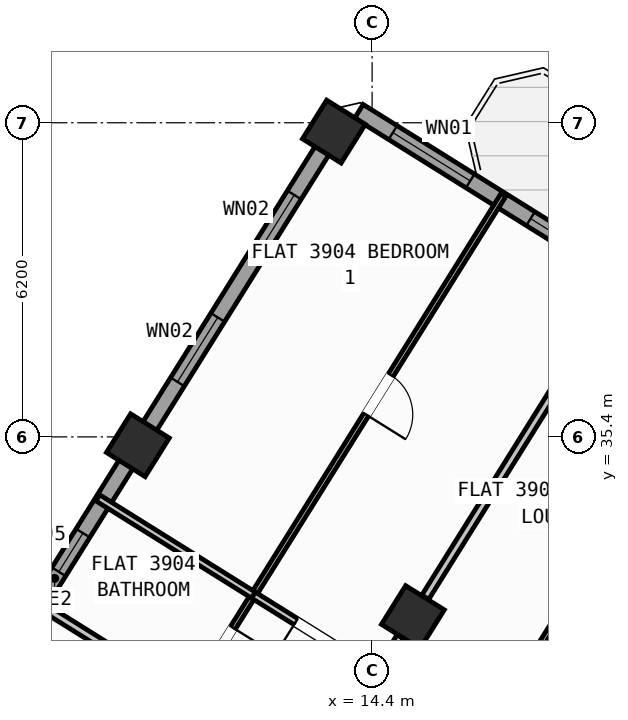
"""IFC4 building model, lengths in metres.
Left out: names, types, materials, properties, quantities, classifications, styles, units other than length and angle.
Written with IfcOpenShell. Run it as: python <this file> out.ifc"""

import sys

from ifc_helpers import new_model, si_unit, direction, frame, frame_2d, origin, origin_2d, place, context, subcontext, project, spatial, rectangle, hollow_rectangle, extrude, source, transform, mapped, element, fill, save


model = new_model("IFC4")
c1 = context("Model", 3, precision=1e-05, world=origin(), true_north=direction((0.0, 1.0)))
c2 = subcontext(c1, "Body", "Model", "MODEL_VIEW")
j1 = project(units=[si_unit("LENGTHUNIT", "METRE"), si_unit("PLANEANGLEUNIT", "RADIAN")], contexts=[c1])
p1 = place(None, origin())
s1 = spatial("IfcSite", under=j1, at=p1, CompositionType="ELEMENT")
p2 = place(p1, origin())
s2 = spatial("IfcBuilding", under=s1, at=p2, CompositionType="ELEMENT")
p3 = place(p2, frame((0.0, 0.0, 155.1)))
s3 = spatial("IfcBuildingStorey", under=s2, at=p3, CompositionType="ELEMENT", Elevation=155.1)
m1 = source(origin(), c2, "Body", "SweptSolid", [
    extrude(hollow_rectangle(XDim=0.9, YDim=0.9, WallThickness=0.036, at=origin_2d()), origin(), (0.0, 0.0, 1.0), 3.6),
])
for number, where, z_axis, x_axis in (
    (1, (15.205, 31.844, 0.0), (0.0, 0.0, 1.0), (-0.848, 0.53, 0.0)),
    (2, (13.646, 41.426, 0.0), (0.0, 0.0, 1.0), (-0.848, 0.53, 0.0)),
    (3, (9.777, 35.235, 0.0), (0.0, 0.0, 1.0), (-0.848, 0.53, 0.0)),
):
    element("IfcColumn", number, at=place(p3, frame(where, z_axis=z_axis, x_axis=x_axis)), inside=s3, PredefinedType="COLUMN", context=c2, shape_type="MappedRepresentation", body=[
        mapped(m1, transform((0.0, 0.0, 0.0), scale=1.0)),
    ])
p4 = place(p3, frame((2.415, 23.452, 0.0), z_axis=(0.0, 0.0, 1.0), x_axis=(0.52991049553, 0.848053575387, 0.0)))
e4 = element("IfcWall", 4, at=p4, inside=s3, PredefinedType="STANDARD", context=c2, shape_type="SweptSolid", body=[
    extrude(rectangle(XDim=21.587, YDim=0.32, at=frame_2d((10.794, 0.0))), origin(), (0.0, 0.0, 1.0), 2.775),
])
p5 = place(p4, frame((1.406, 0.0, 0.8)))
e5 = element("IfcOpeningElement", 5, at=p5, cuts=e4, PredefinedType="OPENING", context=c2, shape_type="SweptSolid", body=[
    extrude(rectangle(XDim=2.1, YDim=1.55, at=frame_2d((1.05, 0.775))), frame((0.0, 0.17, 0.0), z_axis=(0.0, -1.0, 0.0), x_axis=(1.0, 0.0, 0.0)), (0.0, 0.0, 1.0), 0.34),
])
p6 = place(p4, frame((10.949, 0.0, 1.0)))
e6 = element("IfcOpeningElement", 6, at=p6, cuts=e4, PredefinedType="OPENING", context=c2, shape_type="SweptSolid", body=[
    extrude(rectangle(XDim=0.9, YDim=1.25, at=frame_2d((0.45, 0.625))), frame((0.0, 0.17, 0.0), z_axis=(0.0, -1.0, 0.0), x_axis=(1.0, 0.0, 0.0)), (0.0, 0.0, 1.0), 0.34),
])
p7 = place(p4, frame((15.369, 0.0, 0.85)))
e7 = element("IfcOpeningElement", 7, at=p7, cuts=e4, PredefinedType="OPENING", context=c2, shape_type="SweptSolid", body=[
    extrude(rectangle(XDim=1.5, YDim=1.5, at=frame_2d((0.75, 0.75))), frame((0.0, 0.17, 0.0), z_axis=(0.0, -1.0, 0.0), x_axis=(1.0, 0.0, 0.0)), (0.0, 0.0, 1.0), 0.34),
])
p8 = place(p4, frame((18.219, 0.0, 0.85)))
e8 = element("IfcOpeningElement", 8, at=p8, cuts=e4, PredefinedType="OPENING", context=c2, shape_type="SweptSolid", body=[
    extrude(rectangle(XDim=1.5, YDim=1.5, at=frame_2d((0.75, 0.75))), frame((0.0, 0.17, 0.0), z_axis=(0.0, -1.0, 0.0), x_axis=(1.0, 0.0, 0.0)), (0.0, 0.0, 1.0), 0.34),
])
p9 = place(p3, frame((14.138, 41.825, 0.0), z_axis=(0.0, 0.0, 1.0), x_axis=(0.848046498049, -0.529921821731, 0.0)))
e9 = element("IfcWall", 9, at=p9, inside=s3, PredefinedType="STANDARD", context=c2, shape_type="SweptSolid", body=[
    extrude(rectangle(XDim=31.588, YDim=0.32, at=frame_2d((15.794, 0.0))), origin(), (0.0, 0.0, 1.0), 3.35),
])
p10 = place(p9, frame((9.792, 0.0, 0.0)))
e10 = element("IfcOpeningElement", 10, at=p10, cuts=e9, PredefinedType="OPENING", context=c2, shape_type="SweptSolid", body=[
    extrude(rectangle(XDim=1.05, YDim=2.15, at=frame_2d((0.525, 1.075))), frame((0.0, 0.17, 0.0), z_axis=(0.0, -1.0, 0.0), x_axis=(1.0, 0.0, 0.0)), (0.0, 0.0, 1.0), 0.34),
])
p11 = place(p9, frame((0.791, 0.0, 0.85)))
e11 = element("IfcOpeningElement", 11, at=p11, cuts=e9, PredefinedType="OPENING", context=c2, shape_type="SweptSolid", body=[
    extrude(rectangle(XDim=1.8, YDim=1.5, at=frame_2d((0.9, 0.75))), frame((0.0, 0.17, 0.0), z_axis=(0.0, -1.0, 0.0), x_axis=(1.0, 0.0, 0.0)), (0.0, 0.0, 1.0), 0.34),
])
p12 = place(p9, frame((3.996, 0.0, 0.95)))
e12 = element("IfcOpeningElement", 12, at=p12, cuts=e9, PredefinedType="OPENING", context=c2, shape_type="SweptSolid", body=[
    extrude(rectangle(XDim=1.2, YDim=1.4, at=frame_2d((0.6, 0.7))), frame((0.0, 0.17, 0.0), z_axis=(0.0, -1.0, 0.0), x_axis=(1.0, 0.0, 0.0)), (0.0, 0.0, 1.0), 0.34),
])
p13 = place(p9, frame((13.874, 0.0, 0.85)))
e13 = element("IfcOpeningElement", 13, at=p13, cuts=e9, PredefinedType="OPENING", context=c2, shape_type="SweptSolid", body=[
    extrude(rectangle(XDim=1.5, YDim=1.5, at=frame_2d((0.75, 0.75))), frame((0.0, 0.17, 0.0), z_axis=(0.0, -1.0, 0.0), x_axis=(1.0, 0.0, 0.0)), (0.0, 0.0, 1.0), 0.34),
])
p14 = place(p9, frame((17.104, 0.0, 1.0)))
e14 = element("IfcOpeningElement", 14, at=p14, cuts=e9, PredefinedType="OPENING", context=c2, shape_type="SweptSolid", body=[
    extrude(rectangle(XDim=0.9, YDim=1.25, at=frame_2d((0.45, 0.625))), frame((0.0, 0.17, 0.0), z_axis=(0.0, -1.0, 0.0), x_axis=(1.0, 0.0, 0.0)), (0.0, 0.0, 1.0), 0.34),
])
p15 = place(p9, frame((22.069, 0.0, 1.0)))
e15 = element("IfcOpeningElement", 15, at=p15, cuts=e9, PredefinedType="OPENING", context=c2, shape_type="SweptSolid", body=[
    extrude(rectangle(XDim=0.9, YDim=1.25, at=frame_2d((0.45, 0.625))), frame((0.0, 0.17, 0.0), z_axis=(0.0, -1.0, 0.0), x_axis=(1.0, 0.0, 0.0)), (0.0, 0.0, 1.0), 0.34),
])
p16 = place(p9, frame((27.519, 0.0, 1.0)))
e16 = element("IfcOpeningElement", 16, at=p16, cuts=e9, PredefinedType="OPENING", context=c2, shape_type="SweptSolid", body=[
    extrude(rectangle(XDim=0.9, YDim=1.25, at=frame_2d((0.45, 0.625))), frame((0.0, 0.17, 0.0), z_axis=(0.0, -1.0, 0.0), x_axis=(1.0, 0.0, 0.0)), (0.0, 0.0, 1.0), 0.34),
])
p17 = place(p3, frame((21.885, 23.306, 0.0), z_axis=(0.0, 0.0, 1.0), x_axis=(-0.848052408131, 0.529912363569, 0.0)))
e17 = element("IfcWall", 17, at=p17, inside=s3, PredefinedType="PARTITIONING", context=c2, shape_type="SweptSolid", body=[
    extrude(rectangle(XDim=16.73, YDim=0.16, at=frame_2d((8.365, 0.0))), origin(), (0.0, 0.0, 1.0), 3.34),
])
p18 = place(p17, frame((1.395, 0.0, 0.0)))
e18 = element("IfcOpeningElement", 18, at=p18, cuts=e17, PredefinedType="OPENING", context=c2, shape_type="SweptSolid", body=[
    extrude(rectangle(XDim=1.0, YDim=2.1, at=frame_2d((0.5, 1.05))), frame((0.0, 0.09, 0.0), z_axis=(0.0, -1.0, 0.0), x_axis=(1.0, 0.0, 0.0)), (0.0, 0.0, 1.0), 0.18),
])
p19 = place(p17, frame((7.82, 0.0, 0.0)))
e19 = element("IfcOpeningElement", 19, at=p19, cuts=e17, PredefinedType="OPENING", context=c2, shape_type="SweptSolid", body=[
    extrude(rectangle(XDim=1.0, YDim=2.1, at=frame_2d((0.5, 1.05))), frame((0.0, 0.09, 0.0), z_axis=(0.0, -1.0, 0.0), x_axis=(1.0, 0.0, 0.0)), (0.0, 0.0, 1.0), 0.18),
])
p20 = place(p17, frame((11.14, 0.0, 0.0)))
e20 = element("IfcOpeningElement", 20, at=p20, cuts=e17, PredefinedType="OPENING", context=c2, shape_type="SweptSolid", body=[
    extrude(rectangle(XDim=1.0, YDim=2.1, at=frame_2d((0.5, 1.05))), frame((0.0, 0.09, 0.0), z_axis=(0.0, -1.0, 0.0), x_axis=(1.0, 0.0, 0.0)), (0.0, 0.0, 1.0), 0.18),
])
p21 = place(p3, frame((18.828, 37.643, 0.0), z_axis=(0.0, 0.0, 1.0), x_axis=(-0.529930102756, -0.848041323399, 0.0)))
e21 = element("IfcWall", 21, at=p21, inside=s3, PredefinedType="PARTITIONING", context=c2, shape_type="SweptSolid", body=[
    extrude(rectangle(XDim=6.376, YDim=0.16, at=frame_2d((3.188, 0.0))), origin(), (0.0, 0.0, 1.0), 2.775),
])
p22 = place(p3, frame((14.96, 31.452, 0.0), z_axis=(0.0, 0.0, 1.0), x_axis=(-0.529924383291, -0.848044897393, 0.0)))
e22 = element("IfcWall", 22, at=p22, inside=s3, PredefinedType="PARTITIONING", context=c2, shape_type="SweptSolid", body=[
    extrude(rectangle(XDim=3.238, YDim=0.16, at=frame_2d((1.619, 0.0))), origin(), (0.0, 0.0, 1.0), 2.775),
])
p23 = place(p3, frame((21.517, 37.356, 0.0), z_axis=(0.0, 0.0, 1.0), x_axis=(-0.529919705034, -0.848047820713, 0.0)))
e23 = element("IfcWall", 23, at=p23, inside=s3, PredefinedType="PARTITIONING", context=c2, shape_type="SweptSolid", body=[
    extrude(rectangle(XDim=9.14, YDim=0.11, at=frame_2d((4.57, 0.0))), origin(), (0.0, 0.0, 1.0), 3.34),
])
p24 = place(p23, frame((0.47, 0.0, 0.0)))
e24 = element("IfcOpeningElement", 24, at=p24, cuts=e23, PredefinedType="OPENING", context=c2, shape_type="SweptSolid", body=[
    extrude(rectangle(XDim=0.92, YDim=2.08, at=frame_2d((0.46, 1.04))), frame((0.0, 0.065, 0.0), z_axis=(0.0, -1.0, 0.0), x_axis=(1.0, 0.0, 0.0)), (0.0, 0.0, 1.0), 0.13),
])
p25 = place(p3, frame((16.995, 40.182, 0.0), z_axis=(0.0, 0.0, 1.0), x_axis=(-0.529927783988, -0.848042772363, 0.0)))
e25 = element("IfcWall", 25, at=p25, inside=s3, PredefinedType="PARTITIONING", context=c2, shape_type="SweptSolid", body=[
    extrude(rectangle(XDim=11.72, YDim=0.11, at=frame_2d((5.86, 0.0))), origin(), (0.0, 0.0, 1.0), 3.34),
])
p26 = place(p25, frame((10.08, 0.0, 0.0)))
e26 = element("IfcOpeningElement", 26, at=p26, cuts=e25, PredefinedType="OPENING", context=c2, shape_type="SweptSolid", body=[
    extrude(rectangle(XDim=0.78, YDim=2.05, at=frame_2d((0.39, 1.025))), frame((0.0, 0.065, 0.0), z_axis=(0.0, -1.0, 0.0), x_axis=(1.0, 0.0, 0.0)), (0.0, 0.0, 1.0), 0.13),
])
p27 = place(p25, frame((4.2, 0.0, 0.0)))
e27 = element("IfcOpeningElement", 27, at=p27, cuts=e25, PredefinedType="OPENING", context=c2, shape_type="SweptSolid", body=[
    extrude(rectangle(XDim=0.92, YDim=2.08, at=frame_2d((0.46, 1.04))), frame((0.0, 0.065, 0.0), z_axis=(0.0, -1.0, 0.0), x_axis=(1.0, 0.0, 0.0)), (0.0, 0.0, 1.0), 0.13),
])
p28 = place(p3, frame((14.516, 30.741, 0.0), z_axis=(0.0, 0.0, 1.0), x_axis=(-0.848059786386, 0.529900555496, 0.0)))
e28 = element("IfcWall", 28, at=p28, inside=s3, PredefinedType="PLUMBINGWALL", context=c2, shape_type="SweptSolid", body=[
    extrude(rectangle(XDim=2.9, YDim=0.14, at=frame_2d((1.45, 0.0))), origin(), (0.0, 0.0, 1.0), 3.34),
])
p29 = place(p28, frame((0.99, 0.0, 0.0)))
e29 = element("IfcOpeningElement", 29, at=p29, cuts=e28, PredefinedType="OPENING", context=c2, shape_type="SweptSolid", body=[
    extrude(rectangle(XDim=0.92, YDim=2.08, at=frame_2d((0.46, 1.04))), frame((0.0, 0.08, 0.0), z_axis=(0.0, -1.0, 0.0), x_axis=(1.0, 0.0, 0.0)), (0.0, 0.0, 1.0), 0.16),
])
p30 = place(p3, frame((12.056, 32.278, 0.0), z_axis=(0.0, 0.0, 1.0), x_axis=(-0.848039976902, 0.529932257535, 0.0)))
e30 = element("IfcWall", 30, at=p30, inside=s3, PredefinedType="PLUMBINGWALL", context=c2, shape_type="SweptSolid", body=[
    extrude(rectangle(XDim=3.62, YDim=0.14, at=frame_2d((1.81, 0.0))), origin(), (0.0, 0.0, 1.0), 3.34),
])
m2 = source(origin(), c2, "Body", "SweptSolid", [
    extrude(rectangle(XDim=0.9, YDim=1.25, at=frame_2d((0.45, 0.625))), frame((0.0, 0.03, 0.0), z_axis=(0.0, -1.0, 0.0), x_axis=(1.0, 0.0, 0.0)), (0.0, 0.0, 1.0), 0.06),
])
p31 = place(p6, origin())
e31 = element("IfcWindow", 31, at=p31, inside=s3, PartitioningType="SINGLE_PANEL", PredefinedType="WINDOW", context=c2, shape_type="MappedRepresentation", body=[
    mapped(m2, transform((0.0, 0.0, 0.0), scale=1.0)),
])
fill(e6, e31)
m3 = source(origin(), c2, "Body", "SweptSolid", [
    extrude(rectangle(XDim=1.5, YDim=1.5, at=frame_2d((0.75, 0.75))), frame((0.0, 0.03, 0.0), z_axis=(0.0, -1.0, 0.0), x_axis=(1.0, 0.0, 0.0)), (0.0, 0.0, 1.0), 0.06),
])
p32 = place(p7, origin())
e32 = element("IfcWindow", 32, at=p32, inside=s3, PartitioningType="SINGLE_PANEL", PredefinedType="WINDOW", context=c2, shape_type="MappedRepresentation", body=[
    mapped(m3, transform((0.0, 0.0, 0.0), scale=1.0)),
])
fill(e7, e32)
p33 = place(p8, origin())
e33 = element("IfcWindow", 33, at=p33, inside=s3, PartitioningType="SINGLE_PANEL", PredefinedType="WINDOW", context=c2, shape_type="MappedRepresentation", body=[
    mapped(m3, transform((0.0, 0.0, 0.0), scale=1.0)),
])
fill(e8, e33)
m4 = source(origin(), c2, "Body", "SweptSolid", [
    extrude(rectangle(XDim=1.8, YDim=1.5, at=frame_2d((0.9, 0.75))), frame((0.0, 0.03, 0.0), z_axis=(0.0, -1.0, 0.0), x_axis=(1.0, 0.0, 0.0)), (0.0, 0.0, 1.0), 0.06),
])
p34 = place(p11, origin())
e34 = element("IfcWindow", 34, at=p34, inside=s3, PartitioningType="SINGLE_PANEL", PredefinedType="WINDOW", context=c2, shape_type="MappedRepresentation", body=[
    mapped(m4, transform((0.0, 0.0, 0.0), scale=1.0)),
])
fill(e11, e34)
m5 = source(origin(), c2, "Body", "SweptSolid", [
    extrude(rectangle(XDim=1.2, YDim=1.4, at=frame_2d((0.6, 0.7))), frame((0.0, 0.03, 0.0), z_axis=(0.0, -1.0, 0.0), x_axis=(1.0, 0.0, 0.0)), (0.0, 0.0, 1.0), 0.06),
])
p35 = place(p12, origin())
e35 = element("IfcWindow", 35, at=p35, inside=s3, PartitioningType="SINGLE_PANEL", PredefinedType="WINDOW", context=c2, shape_type="MappedRepresentation", body=[
    mapped(m5, transform((0.0, 0.0, 0.0), scale=1.0)),
])
fill(e12, e35)
m6 = source(origin(), c2, "Body", "SweptSolid", [
    extrude(rectangle(XDim=0.92, YDim=2.08, at=frame_2d((0.46, 1.04))), frame((0.0, 0.025, 0.0), z_axis=(0.0, -1.0, 0.0), x_axis=(1.0, 0.0, 0.0)), (0.0, 0.0, 1.0), 0.05),
])
p36 = place(p29, origin())
e36 = element("IfcDoor", 36, at=p36, inside=s3, OperationType="SINGLE_SWING_RIGHT", PredefinedType="DOOR", context=c2, shape_type="MappedRepresentation", body=[
    mapped(m6, transform((0.0, 0.0, 0.0), scale=1.0)),
])
fill(e29, e36)
m7 = source(origin(), c2, "Body", "SweptSolid", [
    extrude(rectangle(XDim=0.78, YDim=2.05, at=frame_2d((0.39, 1.025))), frame((0.0, 0.025, 0.0), z_axis=(0.0, -1.0, 0.0), x_axis=(1.0, 0.0, 0.0)), (0.0, 0.0, 1.0), 0.05),
])
p37 = place(p26, origin())
e37 = element("IfcDoor", 37, at=p37, inside=s3, OperationType="SINGLE_SWING_LEFT", PredefinedType="DOOR", context=c2, shape_type="MappedRepresentation", body=[
    mapped(m7, transform((0.0, 0.0, 0.0), scale=1.0)),
])
fill(e26, e37)
p38 = place(p27, origin())
e38 = element("IfcDoor", 38, at=p38, inside=s3, OperationType="SINGLE_SWING_RIGHT", PredefinedType="DOOR", context=c2, shape_type="MappedRepresentation", body=[
    mapped(m6, transform((0.0, 0.0, 0.0), scale=1.0)),
])
fill(e27, e38)
save(model, sys.argv[1])
